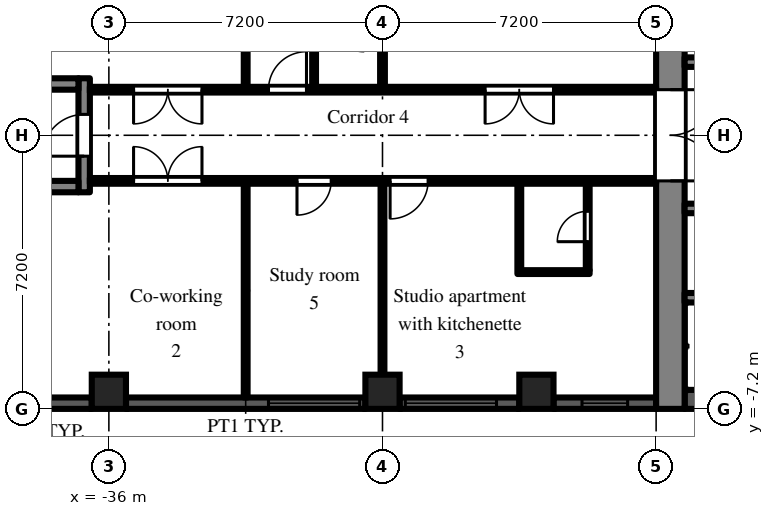
"""IFC4 building model, lengths in metres.
Left out: names, types, materials, properties, quantities, classifications, styles, units other than length and angle.
Written with IfcOpenShell. Run it as: python <this file> out.ifc"""

import sys

from ifc_helpers import new_model, si_unit, direction, frame, frame_2d, origin, origin_2d, place, context, subcontext, project, spatial, rectangle, extrude, element, fill, save


model = new_model("IFC4")
c1 = context("Model", 3, precision=1e-05, world=origin(), true_north=direction((0.0, 1.0)))
c2 = subcontext(c1, "Body", "Model", "MODEL_VIEW")
j1 = project(units=[si_unit("LENGTHUNIT", "METRE"), si_unit("PLANEANGLEUNIT", "RADIAN")], contexts=[c1])
p1 = place(None, origin())
s1 = spatial("IfcSite", under=j1, at=p1, CompositionType="ELEMENT")
p2 = place(p1, origin())
s2 = spatial("IfcBuilding", under=s1, at=p2, CompositionType="ELEMENT")
p3 = place(p2, frame((0.0, 0.0, 93.9)))
s3 = spatial("IfcBuildingStorey", under=s2, at=p3, CompositionType="ELEMENT", Elevation=93.9)
for number, where, z_axis, x_axis in (
    (1, (-36.0, -6.75, 0.0), (0.0, 0.0, 1.0), (1.0, 0.0, 0.0)),
    (2, (-28.8, -6.75, 0.0), (0.0, 0.0, 1.0), (1.0, 0.0, 0.0)),
    (3, (-24.75, -6.75, 0.0), (0.0, 0.0, 1.0), (1.0, 0.0, 0.0)),
):
    element("IfcColumn", number, at=place(p3, frame(where, z_axis=z_axis, x_axis=x_axis)), inside=s3, PredefinedType="COLUMN", context=c2, shape_type="SweptSolid", body=[
        extrude(rectangle(XDim=0.9, YDim=0.9, at=origin_2d()), origin(), (0.0, 0.0, 1.0), 3.0),
    ])
p4 = place(p3, frame((-38.7, -7.05, 0.0), z_axis=(0.0, 0.0, 1.0), x_axis=(1.0, 0.0, 0.0)))
e4 = element("IfcWall", 4, at=p4, inside=s3, PredefinedType="SOLIDWALL", context=c2, shape_type="SweptSolid", body=[
    extrude(rectangle(XDim=2.25, YDim=0.3, at=frame_2d((1.125, 0.0))), origin(), (0.0, 0.0, 1.0), 2.1),
])
p5 = place(p3, frame((-35.55, -7.05, 0.0), z_axis=(0.0, 0.0, 1.0), x_axis=(1.0, 0.0, 0.0)))
e5 = element("IfcWall", 5, at=p5, inside=s3, PredefinedType="SOLIDWALL", context=c2, shape_type="SweptSolid", body=[
    extrude(rectangle(XDim=6.3, YDim=0.3, at=frame_2d((3.15, 0.0))), origin(), (0.0, 0.0, 1.0), 2.1),
])
p6 = place(p5, frame((3.75, 0.0, 0.2)))
e6 = element("IfcOpeningElement", 6, at=p6, cuts=e5, PredefinedType="OPENING", context=c2, shape_type="SweptSolid", body=[
    extrude(rectangle(XDim=2.4, YDim=1.85, at=frame_2d((1.2, 0.925))), frame((0.0, 0.16, 0.0), z_axis=(0.0, -1.0, 0.0), x_axis=(1.0, 0.0, 0.0)), (0.0, 0.0, 1.0), 0.32),
])
p7 = place(p3, frame((-28.35, -7.05, 0.0), z_axis=(0.0, 0.0, 1.0), x_axis=(1.0, 0.0, 0.0)))
e7 = element("IfcWall", 7, at=p7, inside=s3, PredefinedType="SOLIDWALL", context=c2, shape_type="SweptSolid", body=[
    extrude(rectangle(XDim=3.15, YDim=0.3, at=frame_2d((1.575, 0.0))), origin(), (0.0, 0.0, 1.0), 2.1),
])
p8 = place(p7, frame((0.15, 0.0, 0.2)))
e8 = element("IfcOpeningElement", 8, at=p8, cuts=e7, PredefinedType="OPENING", context=c2, shape_type="SweptSolid", body=[
    extrude(rectangle(XDim=2.4, YDim=1.85, at=frame_2d((1.2, 0.925))), frame((0.0, 0.16, 0.0), z_axis=(0.0, -1.0, 0.0), x_axis=(1.0, 0.0, 0.0)), (0.0, 0.0, 1.0), 0.32),
])
p9 = place(p3, frame((-24.3, -7.05, 0.0), z_axis=(0.0, 0.0, 1.0), x_axis=(1.0, 0.0, 0.0)))
e9 = element("IfcWall", 9, at=p9, inside=s3, PredefinedType="SOLIDWALL", context=c2, shape_type="SweptSolid", body=[
    extrude(rectangle(XDim=2.7, YDim=0.3, at=frame_2d((1.35, 0.0))), origin(), (0.0, 0.0, 1.0), 2.1),
])
p10 = place(p9, frame((0.75, 0.0, 0.2)))
e10 = element("IfcOpeningElement", 10, at=p10, cuts=e9, PredefinedType="OPENING", context=c2, shape_type="SweptSolid", body=[
    extrude(rectangle(XDim=1.2, YDim=1.85, at=frame_2d((0.6, 0.925))), frame((0.0, 0.16, 0.0), z_axis=(0.0, -1.0, 0.0), x_axis=(1.0, 0.0, 0.0)), (0.0, 0.0, 1.0), 0.32),
])
p11 = place(p3, frame((-21.225, -7.2, 0.0), z_axis=(0.0, 0.0, 1.0), x_axis=(0.0, 1.0, 0.0)))
e11 = element("IfcWall", 11, at=p11, inside=s3, PredefinedType="SHEAR", context=c2, shape_type="SweptSolid", body=[
    extrude(rectangle(XDim=14.4, YDim=0.75, at=frame_2d((7.2, 0.0))), origin(), (0.0, 0.0, 1.0), 2.575),
])
p12 = place(p11, frame((6.0, 0.0, 0.0)))
e12 = element("IfcOpeningElement", 12, at=p12, cuts=e11, PredefinedType="OPENING", context=c2, shape_type="SweptSolid", body=[
    extrude(rectangle(XDim=2.4, YDim=2.2, at=frame_2d((1.2, 1.1))), frame((0.0, 0.385, 0.0), z_axis=(0.0, -1.0, 0.0), x_axis=(1.0, 0.0, 0.0)), (0.0, 0.0, 1.0), 0.77),
])
p13 = place(p3, frame((-7.9, 1.925, 0.0), z_axis=(0.0, 0.0, 1.0), x_axis=(-1.0, 0.0, 0.0)))
e13 = element("IfcWall", 13, at=p13, inside=s3, PredefinedType="SHEAR", context=c2, shape_type="SweptSolid", body=[
    extrude(rectangle(XDim=12.95, YDim=0.25, at=frame_2d((6.475, 0.0))), origin(), (0.0, 0.0, 1.0), 2.575),
])
p14 = place(p13, frame((0.525, 0.0, 0.0)))
e14 = element("IfcOpeningElement", 14, at=p14, cuts=e13, PredefinedType="OPENING", context=c2, shape_type="SweptSolid", body=[
    extrude(rectangle(XDim=0.9, YDim=2.1, at=frame_2d((0.45, 1.05))), frame((0.0, 0.135, 0.0), z_axis=(0.0, -1.0, 0.0), x_axis=(1.0, 0.0, 0.0)), (0.0, 0.0, 1.0), 0.27),
])
p15 = place(p13, frame((2.625, 0.0, 0.0)))
e15 = element("IfcOpeningElement", 15, at=p15, cuts=e13, PredefinedType="OPENING", context=c2, shape_type="SweptSolid", body=[
    extrude(rectangle(XDim=1.1, YDim=2.1, at=frame_2d((0.55, 1.05))), frame((0.0, 0.135, 0.0), z_axis=(0.0, -1.0, 0.0), x_axis=(1.0, 0.0, 0.0)), (0.0, 0.0, 1.0), 0.27),
])
p16 = place(p13, frame((7.125, 0.0, 0.0)))
e16 = element("IfcOpeningElement", 16, at=p16, cuts=e13, PredefinedType="OPENING", context=c2, shape_type="SweptSolid", body=[
    extrude(rectangle(XDim=0.9, YDim=2.1, at=frame_2d((0.45, 1.05))), frame((0.0, 0.135, 0.0), z_axis=(0.0, -1.0, 0.0), x_axis=(1.0, 0.0, 0.0)), (0.0, 0.0, 1.0), 0.27),
])
p17 = place(p3, frame((-7.9, -6.95, 0.0), z_axis=(0.0, 0.0, 1.0), x_axis=(-1.0, 0.0, 0.0)))
e17 = element("IfcWall", 17, at=p17, inside=s3, PredefinedType="SHEAR", context=c2, shape_type="SweptSolid", body=[
    extrude(rectangle(XDim=12.95, YDim=0.5, at=frame_2d((6.475, 0.0))), origin(), (0.0, 0.0, 1.0), 2.575),
])
p18 = place(p3, frame((-7.9, -1.925, 0.0), z_axis=(0.0, 0.0, 1.0), x_axis=(-1.0, 0.0, 0.0)))
e18 = element("IfcWall", 18, at=p18, inside=s3, PredefinedType="SHEAR", context=c2, shape_type="SweptSolid", body=[
    extrude(rectangle(XDim=12.95, YDim=0.25, at=frame_2d((6.475, 0.0))), origin(), (0.0, 0.0, 1.0), 2.575),
])
p19 = place(p18, frame((4.825, 0.0, 0.0)))
e19 = element("IfcOpeningElement", 19, at=p19, cuts=e18, PredefinedType="OPENING", context=c2, shape_type="SweptSolid", body=[
    extrude(rectangle(XDim=1.1, YDim=2.1, at=frame_2d((0.55, 1.05))), frame((0.0, 0.135, 0.0), z_axis=(0.0, -1.0, 0.0), x_axis=(1.0, 0.0, 0.0)), (0.0, 0.0, 1.0), 0.27),
])
p20 = place(p18, frame((7.025, 0.0, 0.0)))
e20 = element("IfcOpeningElement", 20, at=p20, cuts=e18, PredefinedType="OPENING", context=c2, shape_type="SweptSolid", body=[
    extrude(rectangle(XDim=1.1, YDim=2.1, at=frame_2d((0.55, 1.05))), frame((0.0, 0.135, 0.0), z_axis=(0.0, -1.0, 0.0), x_axis=(1.0, 0.0, 0.0)), (0.0, 0.0, 1.0), 0.27),
])
p21 = place(p18, frame((9.225, 0.0, 0.0)))
e21 = element("IfcOpeningElement", 21, at=p21, cuts=e18, PredefinedType="OPENING", context=c2, shape_type="SweptSolid", body=[
    extrude(rectangle(XDim=1.1, YDim=2.1, at=frame_2d((0.55, 1.05))), frame((0.0, 0.135, 0.0), z_axis=(0.0, -1.0, 0.0), x_axis=(1.0, 0.0, 0.0)), (0.0, 0.0, 1.0), 0.27),
])
p22 = place(p18, frame((0.525, 0.0, 0.0)))
e22 = element("IfcOpeningElement", 22, at=p22, cuts=e18, PredefinedType="OPENING", context=c2, shape_type="SweptSolid", body=[
    extrude(rectangle(XDim=0.9, YDim=2.1, at=frame_2d((0.45, 1.05))), frame((0.0, 0.135, 0.0), z_axis=(0.0, -1.0, 0.0), x_axis=(1.0, 0.0, 0.0)), (0.0, 0.0, 1.0), 0.27),
])
p23 = place(p18, frame((2.625, 0.0, 0.0)))
e23 = element("IfcOpeningElement", 23, at=p23, cuts=e18, PredefinedType="OPENING", context=c2, shape_type="SweptSolid", body=[
    extrude(rectangle(XDim=1.1, YDim=2.1, at=frame_2d((0.55, 1.05))), frame((0.0, 0.135, 0.0), z_axis=(0.0, -1.0, 0.0), x_axis=(1.0, 0.0, 0.0)), (0.0, 0.0, 1.0), 0.27),
])
p24 = place(p3, frame((-12.3, -4.275, 0.0), z_axis=(0.0, 0.0, 1.0), x_axis=(-1.0, 0.0, 0.0)))
e24 = element("IfcWall", 24, at=p24, inside=s3, PredefinedType="SHEAR", context=c2, shape_type="SweptSolid", body=[
    extrude(rectangle(XDim=8.55, YDim=0.25, at=frame_2d((4.275, 0.0))), origin(), (0.0, 0.0, 1.0), 2.575),
])
p25 = place(p3, frame((-36.65, -1.5, 0.0), z_axis=(0.0, 0.0, 1.0), x_axis=(0.0, 1.0, 0.0)))
e25 = element("IfcWall", 25, at=p25, inside=s3, PredefinedType="SHEAR", context=c2, shape_type="SweptSolid", body=[
    extrude(rectangle(XDim=3.0, YDim=0.3, at=frame_2d((1.5, 0.0))), origin(), (0.0, 0.0, 1.0), 2.575),
])
p26 = place(p25, frame((0.95, 0.0, 0.0)))
e26 = element("IfcOpeningElement", 26, at=p26, cuts=e25, PredefinedType="OPENING", context=c2, shape_type="SweptSolid", body=[
    extrude(rectangle(XDim=1.1, YDim=2.1, at=frame_2d((0.55, 1.05))), frame((0.0, 0.16, 0.0), z_axis=(0.0, -1.0, 0.0), x_axis=(1.0, 0.0, 0.0)), (0.0, 0.0, 1.0), 0.32),
])
for number, where, z_axis, x_axis in (
    (27, (-36.8, -1.35, 0.0), (0.0, 0.0, 1.0), (-1.0, 0.0, 0.0)),
    (28, (-36.8, 1.35, 0.0), (0.0, 0.0, 1.0), (-1.0, 0.0, 0.0)),
):
    element("IfcWall", number, at=place(p3, frame(where, z_axis=z_axis, x_axis=x_axis)), inside=s3, PredefinedType="SHEAR", context=c2, shape_type="SweptSolid", body=[
        extrude(rectangle(XDim=5.8, YDim=0.3, at=frame_2d((2.9, 0.0))), origin(), (0.0, 0.0, 1.0), 2.575),
    ])
p27 = place(p3, frame((-36.5, -1.2, 0.0), z_axis=(0.0, 0.0, 1.0), x_axis=(1.0, 0.0, 0.0)))
e29 = element("IfcWall", 29, at=p27, inside=s3, PredefinedType="PARTITIONING", context=c2, shape_type="SweptSolid", body=[
    extrude(rectangle(XDim=14.9, YDim=0.15, at=frame_2d((7.45, 0.0))), origin(), (0.0, 0.0, 1.0), 2.575),
])
p28 = place(p27, frame((7.9, 0.0, 0.0)))
e30 = element("IfcOpeningElement", 30, at=p28, cuts=e29, PredefinedType="OPENING", context=c2, shape_type="SweptSolid", body=[
    extrude(rectangle(XDim=1.0, YDim=2.1, at=frame_2d((0.5, 1.05))), frame((0.0, 0.085, 0.0), z_axis=(0.0, -1.0, 0.0), x_axis=(1.0, 0.0, 0.0)), (0.0, 0.0, 1.0), 0.17),
])
p29 = place(p27, frame((5.45, 0.0, 0.0)))
e31 = element("IfcOpeningElement", 31, at=p29, cuts=e29, PredefinedType="OPENING", context=c2, shape_type="SweptSolid", body=[
    extrude(rectangle(XDim=0.9, YDim=2.1, at=frame_2d((0.45, 1.05))), frame((0.0, 0.085, 0.0), z_axis=(0.0, -1.0, 0.0), x_axis=(1.0, 0.0, 0.0)), (0.0, 0.0, 1.0), 0.17),
])
p30 = place(p27, frame((1.15, 0.0, 0.0)))
e32 = element("IfcOpeningElement", 32, at=p30, cuts=e29, PredefinedType="OPENING", context=c2, shape_type="SweptSolid", body=[
    extrude(rectangle(XDim=1.8, YDim=2.1, at=frame_2d((0.9, 1.05))), frame((0.0, 0.085, 0.0), z_axis=(0.0, -1.0, 0.0), x_axis=(1.0, 0.0, 0.0)), (0.0, 0.0, 1.0), 0.17),
])
p31 = place(p3, frame((-36.5, 1.2, 0.0), z_axis=(0.0, 0.0, 1.0), x_axis=(1.0, 0.0, 0.0)))
e33 = element("IfcWall", 33, at=p31, inside=s3, PredefinedType="PARTITIONING", context=c2, shape_type="SweptSolid", body=[
    extrude(rectangle(XDim=14.9, YDim=0.15, at=frame_2d((7.45, 0.0))), origin(), (0.0, 0.0, 1.0), 2.575),
])
p32 = place(p31, frame((10.4, 0.0, 0.0)))
e34 = element("IfcOpeningElement", 34, at=p32, cuts=e33, PredefinedType="OPENING", context=c2, shape_type="SweptSolid", body=[
    extrude(rectangle(XDim=1.8, YDim=2.1, at=frame_2d((0.9, 1.05))), frame((0.0, 0.085, 0.0), z_axis=(0.0, -1.0, 0.0), x_axis=(1.0, 0.0, 0.0)), (0.0, 0.0, 1.0), 0.17),
])
p33 = place(p31, frame((4.7, 0.0, 0.0)))
e35 = element("IfcOpeningElement", 35, at=p33, cuts=e33, PredefinedType="OPENING", context=c2, shape_type="SweptSolid", body=[
    extrude(rectangle(XDim=1.0, YDim=2.1, at=frame_2d((0.5, 1.05))), frame((0.0, 0.085, 0.0), z_axis=(0.0, -1.0, 0.0), x_axis=(1.0, 0.0, 0.0)), (0.0, 0.0, 1.0), 0.17),
])
p34 = place(p31, frame((1.15, 0.0, 0.0)))
e36 = element("IfcOpeningElement", 36, at=p34, cuts=e33, PredefinedType="OPENING", context=c2, shape_type="SweptSolid", body=[
    extrude(rectangle(XDim=1.8, YDim=2.1, at=frame_2d((0.9, 1.05))), frame((0.0, 0.085, 0.0), z_axis=(0.0, -1.0, 0.0), x_axis=(1.0, 0.0, 0.0)), (0.0, 0.0, 1.0), 0.17),
])
for number, where, z_axis, x_axis in (
    (37, (-32.4, -6.9, 0.0), (0.0, 0.0, 1.0), (0.0, 1.0, 0.0)),
    (38, (-32.4, 1.275, 0.0), (0.0, 0.0, 1.0), (0.0, 1.0, 0.0)),
):
    element("IfcWall", number, at=place(p3, frame(where, z_axis=z_axis, x_axis=x_axis)), inside=s3, PredefinedType="PARTITIONING", context=c2, shape_type="SweptSolid", body=[
        extrude(rectangle(XDim=5.625, YDim=0.1, at=frame_2d((2.812, 0.0))), origin(), (0.0, 0.0, 1.0), 2.575),
    ])
p35 = place(p3, frame((-30.6, 1.275, 0.0), z_axis=(0.0, 0.0, 1.0), x_axis=(0.0, 1.0, 0.0)))
e39 = element("IfcWall", 39, at=p35, inside=s3, PredefinedType="PARTITIONING", context=c2, shape_type="SweptSolid", body=[
    extrude(rectangle(XDim=1.775, YDim=0.1, at=frame_2d((0.888, 0.0))), origin(), (0.0, 0.0, 1.0), 2.575),
])
p36 = place(p3, frame((-28.8, -6.9, 0.0), z_axis=(0.0, 0.0, 1.0), x_axis=(0.0, 1.0, 0.0)))
e40 = element("IfcWall", 40, at=p36, inside=s3, PredefinedType="PARTITIONING", context=c2, shape_type="SweptSolid", body=[
    extrude(rectangle(XDim=5.625, YDim=0.1, at=frame_2d((2.812, 0.0))), origin(), (0.0, 0.0, 1.0), 2.575),
])
p37 = place(p3, frame((-28.8, 1.275, 0.0), z_axis=(0.0, 0.0, 1.0), x_axis=(0.0, 1.0, 0.0)))
e41 = element("IfcWall", 41, at=p37, inside=s3, PredefinedType="PARTITIONING", context=c2, shape_type="SweptSolid", body=[
    extrude(rectangle(XDim=1.725, YDim=0.125, at=frame_2d((0.863, 0.0))), origin(), (0.0, 0.0, 1.0), 2.575),
])
p38 = place(p3, frame((-25.2, -3.65, 0.0), z_axis=(0.0, 0.0, 1.0), x_axis=(0.0, 1.0, 0.0)))
e42 = element("IfcWall", 42, at=p38, inside=s3, PredefinedType="PARTITIONING", context=c2, shape_type="SweptSolid", body=[
    extrude(rectangle(XDim=2.375, YDim=0.1, at=frame_2d((1.188, 0.0))), origin(), (0.0, 0.0, 1.0), 2.575),
])
p39 = place(p3, frame((-25.15, -3.6, 0.0), z_axis=(0.0, 0.0, 1.0), x_axis=(1.0, 0.0, 0.0)))
e43 = element("IfcWall", 43, at=p39, inside=s3, PredefinedType="PARTITIONING", context=c2, shape_type="SweptSolid", body=[
    extrude(rectangle(XDim=1.8, YDim=0.1, at=frame_2d((0.9, 0.0))), origin(), (0.0, 0.0, 1.0), 2.575),
])
p40 = place(p3, frame((-23.4, -3.55, 0.0), z_axis=(0.0, 0.0, 1.0), x_axis=(0.0, 1.0, 0.0)))
e44 = element("IfcWall", 44, at=p40, inside=s3, PredefinedType="PARTITIONING", context=c2, shape_type="SweptSolid", body=[
    extrude(rectangle(XDim=2.275, YDim=0.1, at=frame_2d((1.138, 0.0))), origin(), (0.0, 0.0, 1.0), 2.575),
])
p41 = place(p40, frame((0.75, 0.0, 0.0)))
e45 = element("IfcOpeningElement", 45, at=p41, cuts=e44, PredefinedType="OPENING", context=c2, shape_type="SweptSolid", body=[
    extrude(rectangle(XDim=0.8, YDim=2.1, at=frame_2d((0.4, 1.05))), frame((0.0, 0.06, 0.0), z_axis=(0.0, -1.0, 0.0), x_axis=(1.0, 0.0, 0.0)), (0.0, 0.0, 1.0), 0.12),
])
p42 = place(p6, origin())
e46 = element("IfcWindow", 46, at=p42, inside=s3, PartitioningType="SINGLE_PANEL", PredefinedType="WINDOW", context=c2, shape_type="SweptSolid", body=[
    extrude(rectangle(XDim=2.4, YDim=1.85, at=frame_2d((1.2, 0.925))), frame((0.0, 0.03, 0.0), z_axis=(0.0, -1.0, 0.0), x_axis=(1.0, 0.0, 0.0)), (0.0, 0.0, 1.0), 0.06),
])
fill(e6, e46)
p43 = place(p8, origin())
e47 = element("IfcWindow", 47, at=p43, inside=s3, PartitioningType="SINGLE_PANEL", PredefinedType="WINDOW", context=c2, shape_type="SweptSolid", body=[
    extrude(rectangle(XDim=2.4, YDim=1.85, at=frame_2d((1.2, 0.925))), frame((0.0, 0.03, 0.0), z_axis=(0.0, -1.0, 0.0), x_axis=(1.0, 0.0, 0.0)), (0.0, 0.0, 1.0), 0.06),
])
fill(e8, e47)
p44 = place(p10, origin())
e48 = element("IfcWindow", 48, at=p44, inside=s3, PartitioningType="SINGLE_PANEL", PredefinedType="WINDOW", context=c2, shape_type="SweptSolid", body=[
    extrude(rectangle(XDim=1.2, YDim=1.85, at=frame_2d((0.6, 0.925))), frame((0.0, 0.03, 0.0), z_axis=(0.0, -1.0, 0.0), x_axis=(1.0, 0.0, 0.0)), (0.0, 0.0, 1.0), 0.06),
])
fill(e10, e48)
p45 = place(p12, frame((2.4, 0.0, 0.0), z_axis=(0.0, 0.0, 1.0), x_axis=(-1.0, 0.0, 0.0)))
e49 = element("IfcDoor", 49, at=p45, inside=s3, OperationType="DOUBLE_DOOR_DOUBLE_SWING", PredefinedType="DOOR", context=c2, shape_type="SweptSolid", body=[
    extrude(rectangle(XDim=2.4, YDim=2.2, at=frame_2d((1.2, 1.1))), frame((0.0, 0.025, 0.0), z_axis=(0.0, -1.0, 0.0), x_axis=(1.0, 0.0, 0.0)), (0.0, 0.0, 1.0), 0.05),
])
fill(e12, e49)
p46 = place(p26, origin())
e50 = element("IfcDoor", 50, at=p46, inside=s3, OperationType="SINGLE_SWING_LEFT", PredefinedType="DOOR", context=c2, shape_type="SweptSolid", body=[
    extrude(rectangle(XDim=1.1, YDim=2.1, at=frame_2d((0.55, 1.05))), frame((0.0, 0.025, 0.0), z_axis=(0.0, -1.0, 0.0), x_axis=(1.0, 0.0, 0.0)), (0.0, 0.0, 1.0), 0.05),
])
fill(e26, e50)
p47 = place(p41, origin())
e51 = element("IfcDoor", 51, at=p47, inside=s3, OperationType="SINGLE_SWING_LEFT", PredefinedType="DOOR", context=c2, shape_type="SweptSolid", body=[
    extrude(rectangle(XDim=0.8, YDim=2.1, at=frame_2d((0.4, 1.05))), frame((0.0, 0.025, 0.0), z_axis=(0.0, -1.0, 0.0), x_axis=(1.0, 0.0, 0.0)), (0.0, 0.0, 1.0), 0.05),
])
fill(e45, e51)
p48 = place(p28, frame((1.0, 0.0, 0.0), z_axis=(0.0, 0.0, 1.0), x_axis=(-1.0, 0.0, 0.0)))
e52 = element("IfcDoor", 52, at=p48, inside=s3, OperationType="SINGLE_SWING_RIGHT", PredefinedType="DOOR", context=c2, shape_type="SweptSolid", body=[
    extrude(rectangle(XDim=1.0, YDim=2.1, at=frame_2d((0.5, 1.05))), frame((0.0, 0.025, 0.0), z_axis=(0.0, -1.0, 0.0), x_axis=(1.0, 0.0, 0.0)), (0.0, 0.0, 1.0), 0.05),
])
fill(e30, e52)
p49 = place(p29, frame((0.9, 0.0, 0.0), z_axis=(0.0, 0.0, 1.0), x_axis=(-1.0, 0.0, 0.0)))
e53 = element("IfcDoor", 53, at=p49, inside=s3, OperationType="SINGLE_SWING_RIGHT", PredefinedType="DOOR", context=c2, shape_type="SweptSolid", body=[
    extrude(rectangle(XDim=0.9, YDim=2.1, at=frame_2d((0.45, 1.05))), frame((0.0, 0.025, 0.0), z_axis=(0.0, -1.0, 0.0), x_axis=(1.0, 0.0, 0.0)), (0.0, 0.0, 1.0), 0.05),
])
fill(e31, e53)
p50 = place(p30, origin())
e54 = element("IfcDoor", 54, at=p50, inside=s3, OperationType="DOUBLE_DOOR_DOUBLE_SWING", PredefinedType="DOOR", context=c2, shape_type="SweptSolid", body=[
    extrude(rectangle(XDim=1.8, YDim=2.1, at=frame_2d((0.9, 1.05))), frame((0.0, 0.025, 0.0), z_axis=(0.0, -1.0, 0.0), x_axis=(1.0, 0.0, 0.0)), (0.0, 0.0, 1.0), 0.05),
])
fill(e32, e54)
p51 = place(p32, frame((1.8, 0.0, 0.0), z_axis=(0.0, 0.0, 1.0), x_axis=(-1.0, 0.0, 0.0)))
e55 = element("IfcDoor", 55, at=p51, inside=s3, OperationType="DOUBLE_DOOR_DOUBLE_SWING", PredefinedType="DOOR", context=c2, shape_type="SweptSolid", body=[
    extrude(rectangle(XDim=1.8, YDim=2.1, at=frame_2d((0.9, 1.05))), frame((0.0, 0.025, 0.0), z_axis=(0.0, -1.0, 0.0), x_axis=(1.0, 0.0, 0.0)), (0.0, 0.0, 1.0), 0.05),
])
fill(e34, e55)
p52 = place(p33, origin())
e56 = element("IfcDoor", 56, at=p52, inside=s3, OperationType="SINGLE_SWING_RIGHT", PredefinedType="DOOR", context=c2, shape_type="SweptSolid", body=[
    extrude(rectangle(XDim=1.0, YDim=2.1, at=frame_2d((0.5, 1.05))), frame((0.0, 0.025, 0.0), z_axis=(0.0, -1.0, 0.0), x_axis=(1.0, 0.0, 0.0)), (0.0, 0.0, 1.0), 0.05),
])
fill(e35, e56)
p53 = place(p34, frame((1.8, 0.0, 0.0), z_axis=(0.0, 0.0, 1.0), x_axis=(-1.0, 0.0, 0.0)))
e57 = element("IfcDoor", 57, at=p53, inside=s3, OperationType="DOUBLE_DOOR_DOUBLE_SWING", PredefinedType="DOOR", context=c2, shape_type="SweptSolid", body=[
    extrude(rectangle(XDim=1.8, YDim=2.1, at=frame_2d((0.9, 1.05))), frame((0.0, 0.025, 0.0), z_axis=(0.0, -1.0, 0.0), x_axis=(1.0, 0.0, 0.0)), (0.0, 0.0, 1.0), 0.05),
])
fill(e36, e57)
save(model, sys.argv[1])
